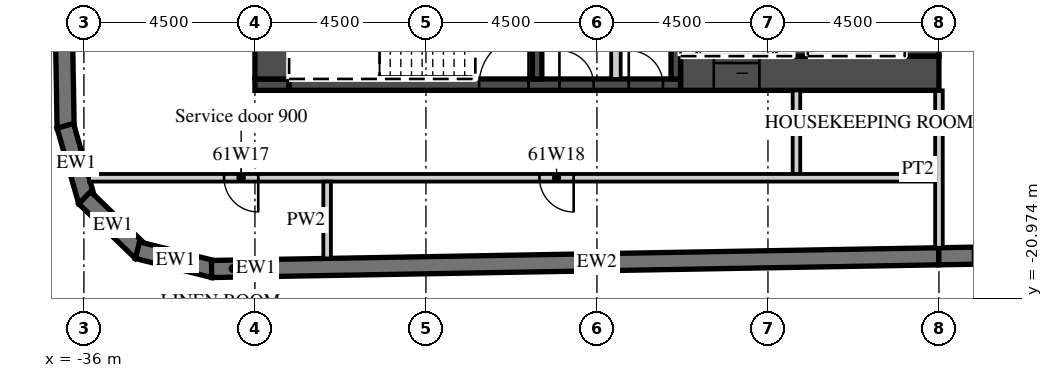
"""IFC4 building model, lengths in metres.
Left out: names, types, materials, properties, quantities, classifications, styles, units other than length and angle.
Written with IfcOpenShell. Run it as: python <this file> out.ifc"""

import sys

from ifc_helpers import new_model, si_unit, direction, frame, frame_2d, origin, place, context, subcontext, project, spatial, polyline, rectangle, outline, extrude, element, fill, save


model = new_model("IFC4")
c1 = context("Model", 3, precision=1e-05, world=origin(), true_north=direction((0.0, 1.0)))
c2 = subcontext(c1, "Body", "Model", "MODEL_VIEW")
j1 = project(units=[si_unit("LENGTHUNIT", "METRE"), si_unit("PLANEANGLEUNIT", "RADIAN")], contexts=[c1])
p1 = place(None, origin())
s1 = spatial("IfcSite", under=j1, at=p1, CompositionType="ELEMENT")
p2 = place(p1, origin())
s2 = spatial("IfcBuilding", under=s1, at=p2, CompositionType="ELEMENT")
p3 = place(p2, frame((0.0, 0.0, 247.4)))
s3 = spatial("IfcBuildingStorey", under=s2, at=p3, CompositionType="ELEMENT", Elevation=247.4)
p4 = place(p3, frame((-37.057, 16.503, 0.0), z_axis=(0.0, 0.0, 1.0), x_axis=(0.017452279857, -0.999847697366, 0.0)))
e1 = element("IfcWall", 1, at=p4, inside=s3, PredefinedType="SOLIDWALL", context=c2, shape_type="SweptSolid", body=[
    extrude(rectangle(XDim=33.0, YDim=0.45, at=frame_2d((16.5, 0.0))), origin(), (0.0, 0.0, 1.0), 3.02),
])
p5 = place(p3, frame((-36.49, -16.434, 0.0), z_axis=(0.0, 0.0, 1.0), x_axis=(0.275577603096, -0.961278827745, 0.0)))
e2 = element("IfcWall", 2, at=p5, inside=s3, PredefinedType="SOLIDWALL", context=c2, shape_type="SweptSolid", body=[
    extrude(outline(polyline([(0.0, -0.225), (2.071, -0.225), (1.95, 0.225), (0.121, 0.225), (0.0, -0.225)])), origin(), (0.0, 0.0, 1.0), 3.02),
])
p6 = place(p3, frame((-35.979, -18.324, 0.0), z_axis=(0.0, 0.0, 1.0), x_axis=(0.719320193998, -0.694678672846, 0.0)))
e3 = element("IfcWall", 3, at=p6, inside=s3, PredefinedType="SOLIDWALL", context=c2, shape_type="SweptSolid", body=[
    extrude(outline(polyline([(0.0, -0.225), (2.071, -0.225), (1.95, 0.225), (0.121, 0.225), (0.0, -0.225)])), origin(), (0.0, 0.0, 1.0), 3.02),
])
p7 = place(p3, frame((-34.591, -19.706, 0.0), z_axis=(0.0, 0.0, 1.0), x_axis=(0.970315655375, -0.241841950319, 0.0)))
e4 = element("IfcWall", 4, at=p7, inside=s3, PredefinedType="SOLIDWALL", context=c2, shape_type="SweptSolid", body=[
    extrude(outline(polyline([(0.0, -0.225), (2.071, -0.225), (1.95, 0.225), (0.121, 0.225), (0.0, -0.225)])), origin(), (0.0, 0.0, 1.0), 3.02),
])
p8 = place(p3, frame((-32.641, -20.2, 0.0), z_axis=(0.0, 0.0, 1.0), x_axis=(0.99984870815, 0.017394275206, 0.0)))
e5 = element("IfcWall", 5, at=p8, inside=s3, PredefinedType="SOLIDWALL", context=c2, shape_type="SweptSolid", body=[
    extrude(rectangle(XDim=1.137, YDim=0.45, at=frame_2d((0.568, 0.0))), origin(), (0.0, 0.0, 1.0), 3.02),
])
p9 = place(p3, frame((-31.504, -20.18, 0.0), z_axis=(0.0, 0.0, 1.0), x_axis=(0.999847677887, 0.017453395744, 0.0)))
e6 = element("IfcWall", 6, at=p9, inside=s3, PredefinedType="SOLIDWALL", context=c2, shape_type="SweptSolid", body=[
    extrude(rectangle(XDim=18.003, YDim=0.45, at=frame_2d((9.001, 0.0))), origin(), (0.0, 0.0, 1.0), 3.02),
])
p10 = place(p3, frame((-13.504, -19.866, 0.0), z_axis=(0.0, 0.0, 1.0), x_axis=(0.999847672978, 0.017453676992, 0.0)))
e7 = element("IfcWall", 7, at=p10, inside=s3, PredefinedType="SOLIDWALL", context=c2, shape_type="SweptSolid", body=[
    extrude(rectangle(XDim=52.86, YDim=0.45, at=frame_2d((26.43, 0.0))), origin(), (0.0, 0.0, 1.0), 3.02),
])
p11 = place(p10, frame((0.9, 0.0, 0.45)))
e8 = element("IfcOpeningElement", 8, at=p11, cuts=e7, PredefinedType="OPENING", context=c2, shape_type="SweptSolid", body=[
    extrude(rectangle(XDim=2.7, YDim=2.25, at=frame_2d((1.35, 1.125))), frame((0.0, 0.235, 0.0), z_axis=(0.0, -1.0, 0.0), x_axis=(1.0, 0.0, 0.0)), (0.0, 0.0, 1.0), 0.47),
])
p12 = place(p10, frame((5.401, 0.0, 0.45)))
e9 = element("IfcOpeningElement", 9, at=p12, cuts=e7, PredefinedType="OPENING", context=c2, shape_type="SweptSolid", body=[
    extrude(rectangle(XDim=2.7, YDim=2.25, at=frame_2d((1.35, 1.125))), frame((0.0, 0.235, 0.0), z_axis=(0.0, -1.0, 0.0), x_axis=(1.0, 0.0, 0.0)), (0.0, 0.0, 1.0), 0.47),
])
p13 = place(p10, frame((9.902, 0.0, 0.45)))
e10 = element("IfcOpeningElement", 10, at=p13, cuts=e7, PredefinedType="OPENING", context=c2, shape_type="SweptSolid", body=[
    extrude(rectangle(XDim=2.7, YDim=2.25, at=frame_2d((1.35, 1.125))), frame((0.0, 0.235, 0.0), z_axis=(0.0, -1.0, 0.0), x_axis=(1.0, 0.0, 0.0)), (0.0, 0.0, 1.0), 0.47),
])
p14 = place(p10, frame((14.402, 0.0, 0.45)))
e11 = element("IfcOpeningElement", 11, at=p14, cuts=e7, PredefinedType="OPENING", context=c2, shape_type="SweptSolid", body=[
    extrude(rectangle(XDim=2.7, YDim=2.25, at=frame_2d((1.35, 1.125))), frame((0.0, 0.235, 0.0), z_axis=(0.0, -1.0, 0.0), x_axis=(1.0, 0.0, 0.0)), (0.0, 0.0, 1.0), 0.47),
])
p15 = place(p10, frame((18.903, 0.0, 0.45)))
e12 = element("IfcOpeningElement", 12, at=p15, cuts=e7, PredefinedType="OPENING", context=c2, shape_type="SweptSolid", body=[
    extrude(rectangle(XDim=2.7, YDim=2.25, at=frame_2d((1.35, 1.125))), frame((0.0, 0.235, 0.0), z_axis=(0.0, -1.0, 0.0), x_axis=(1.0, 0.0, 0.0)), (0.0, 0.0, 1.0), 0.47),
])
p16 = place(p10, frame((23.404, 0.0, 0.45)))
e13 = element("IfcOpeningElement", 13, at=p16, cuts=e7, PredefinedType="OPENING", context=c2, shape_type="SweptSolid", body=[
    extrude(rectangle(XDim=2.7, YDim=2.25, at=frame_2d((1.35, 1.125))), frame((0.0, 0.235, 0.0), z_axis=(0.0, -1.0, 0.0), x_axis=(1.0, 0.0, 0.0)), (0.0, 0.0, 1.0), 0.47),
])
p17 = place(p10, frame((27.904, 0.0, 0.45)))
e14 = element("IfcOpeningElement", 14, at=p17, cuts=e7, PredefinedType="OPENING", context=c2, shape_type="SweptSolid", body=[
    extrude(rectangle(XDim=2.7, YDim=2.25, at=frame_2d((1.35, 1.125))), frame((0.0, 0.235, 0.0), z_axis=(0.0, -1.0, 0.0), x_axis=(1.0, 0.0, 0.0)), (0.0, 0.0, 1.0), 0.47),
])
p18 = place(p10, frame((32.405, 0.0, 0.45)))
e15 = element("IfcOpeningElement", 15, at=p18, cuts=e7, PredefinedType="OPENING", context=c2, shape_type="SweptSolid", body=[
    extrude(rectangle(XDim=2.7, YDim=2.25, at=frame_2d((1.35, 1.125))), frame((0.0, 0.235, 0.0), z_axis=(0.0, -1.0, 0.0), x_axis=(1.0, 0.0, 0.0)), (0.0, 0.0, 1.0), 0.47),
])
p19 = place(p10, frame((36.906, 0.0, 0.45)))
e16 = element("IfcOpeningElement", 16, at=p19, cuts=e7, PredefinedType="OPENING", context=c2, shape_type="SweptSolid", body=[
    extrude(rectangle(XDim=2.7, YDim=2.25, at=frame_2d((1.35, 1.125))), frame((0.0, 0.235, 0.0), z_axis=(0.0, -1.0, 0.0), x_axis=(1.0, 0.0, 0.0)), (0.0, 0.0, 1.0), 0.47),
])
p20 = place(p10, frame((41.406, 0.0, 0.45)))
e17 = element("IfcOpeningElement", 17, at=p20, cuts=e7, PredefinedType="OPENING", context=c2, shape_type="SweptSolid", body=[
    extrude(rectangle(XDim=2.7, YDim=2.25, at=frame_2d((1.35, 1.125))), frame((0.0, 0.235, 0.0), z_axis=(0.0, -1.0, 0.0), x_axis=(1.0, 0.0, 0.0)), (0.0, 0.0, 1.0), 0.47),
])
p21 = place(p10, frame((45.907, 0.0, 0.45)))
e18 = element("IfcOpeningElement", 18, at=p21, cuts=e7, PredefinedType="OPENING", context=c2, shape_type="SweptSolid", body=[
    extrude(rectangle(XDim=2.7, YDim=2.25, at=frame_2d((1.35, 1.125))), frame((0.0, 0.235, 0.0), z_axis=(0.0, -1.0, 0.0), x_axis=(1.0, 0.0, 0.0)), (0.0, 0.0, 1.0), 0.47),
])
p22 = place(p3, frame((-13.5, -19.641, 0.0), z_axis=(0.0, 0.0, 1.0), x_axis=(0.0, 1.0, 0.0)))
e19 = element("IfcWall", 19, at=p22, inside=s3, PredefinedType="PARTITIONING", context=c2, shape_type="SweptSolid", body=[
    extrude(rectangle(XDim=4.141, YDim=0.2, at=frame_2d((2.071, 0.0))), origin(), (0.0, 0.0, 1.0), 3.02),
])
p23 = place(p3, frame((-20.3, -15.05, 0.0), z_axis=(0.0, 0.0, 1.0), x_axis=(1.0, 0.0, 0.0)))
e20 = element("IfcWall", 20, at=p23, inside=s3, PredefinedType="SHEAR", context=c2, shape_type="SweptSolid", body=[
    extrude(rectangle(XDim=6.8, YDim=0.9, at=frame_2d((3.4, 0.0))), origin(), (0.0, 0.0, 1.0), 3.02),
])
p24 = place(p23, frame((0.875, 0.0, 0.0)))
e21 = element("IfcOpeningElement", 21, at=p24, cuts=e20, PredefinedType="OPENING", context=c2, shape_type="SweptSolid", body=[
    extrude(rectangle(XDim=1.2, YDim=2.1, at=frame_2d((0.6, 1.05))), frame((0.0, 0.46, 0.0), z_axis=(0.0, -1.0, 0.0), x_axis=(1.0, 0.0, 0.0)), (0.0, 0.0, 1.0), 0.92),
])
p25 = place(p3, frame((-31.5, -15.35, 0.0), z_axis=(0.0, 0.0, 1.0), x_axis=(1.0, 0.0, 0.0)))
e22 = element("IfcWall", 22, at=p25, inside=s3, PredefinedType="SHEAR", context=c2, shape_type="SweptSolid", body=[
    extrude(rectangle(XDim=0.9, YDim=0.3, at=frame_2d((0.45, 0.0))), origin(), (0.0, 0.0, 1.0), 3.02),
])
p26 = place(p3, frame((-30.6, -15.35, 0.0), z_axis=(0.0, 0.0, 1.0), x_axis=(1.0, 0.0, 0.0)))
e23 = element("IfcWall", 23, at=p26, inside=s3, PredefinedType="SHEAR", context=c2, shape_type="SweptSolid", body=[
    extrude(rectangle(XDim=10.3, YDim=0.3, at=frame_2d((5.15, 0.0))), origin(), (0.0, 0.0, 1.0), 3.02),
])
p27 = place(p26, frame((5.0, 0.0, 0.0)))
e24 = element("IfcOpeningElement", 24, at=p27, cuts=e23, PredefinedType="OPENING", context=c2, shape_type="SweptSolid", body=[
    extrude(rectangle(XDim=1.3, YDim=2.1, at=frame_2d((0.65, 1.05))), frame((0.0, 0.16, 0.0), z_axis=(0.0, -1.0, 0.0), x_axis=(1.0, 0.0, 0.0)), (0.0, 0.0, 1.0), 0.32),
])
p28 = place(p26, frame((7.113, 0.0, 0.0)))
e25 = element("IfcOpeningElement", 25, at=p28, cuts=e23, PredefinedType="OPENING", context=c2, shape_type="SweptSolid", body=[
    extrude(rectangle(XDim=0.9, YDim=2.1, at=frame_2d((0.45, 1.05))), frame((0.0, 0.16, 0.0), z_axis=(0.0, -1.0, 0.0), x_axis=(1.0, 0.0, 0.0)), (0.0, 0.0, 1.0), 0.32),
])
p29 = place(p26, frame((8.938, 0.0, 0.0)))
e26 = element("IfcOpeningElement", 26, at=p29, cuts=e23, PredefinedType="OPENING", context=c2, shape_type="SweptSolid", body=[
    extrude(rectangle(XDim=0.9, YDim=2.1, at=frame_2d((0.45, 1.05))), frame((0.0, 0.16, 0.0), z_axis=(0.0, -1.0, 0.0), x_axis=(1.0, 0.0, 0.0)), (0.0, 0.0, 1.0), 0.32),
])
p30 = place(p3, frame((-31.05, -15.2, 0.0), z_axis=(0.0, 0.0, 1.0), x_axis=(0.0, 1.0, 0.0)))
e27 = element("IfcWall", 27, at=p30, inside=s3, PredefinedType="SHEAR", context=c2, shape_type="SweptSolid", body=[
    extrude(rectangle(XDim=12.8, YDim=0.9, at=frame_2d((6.4, 0.0))), origin(), (0.0, 0.0, 1.0), 3.02),
])
p31 = place(p30, frame((11.5, 0.0, 0.0)))
e28 = element("IfcOpeningElement", 28, at=p31, cuts=e27, PredefinedType="OPENING", context=c2, shape_type="SweptSolid", body=[
    extrude(rectangle(XDim=1.1, YDim=2.1, at=frame_2d((0.55, 1.05))), frame((0.0, 0.46, 0.0), z_axis=(0.0, -1.0, 0.0), x_axis=(1.0, 0.0, 0.0)), (0.0, 0.0, 1.0), 0.92),
])
p32 = place(p3, frame((-13.95, -14.6, 0.0), z_axis=(0.0, 0.0, 1.0), x_axis=(0.0, 1.0, 0.0)))
e29 = element("IfcWall", 29, at=p32, inside=s3, PredefinedType="SHEAR", context=c2, shape_type="SweptSolid", body=[
    extrude(rectangle(XDim=12.2, YDim=0.9, at=frame_2d((6.1, 0.0))), origin(), (0.0, 0.0, 1.0), 3.02),
])
p33 = place(p3, frame((-17.15, -14.6, 0.0), z_axis=(0.0, 0.0, 1.0), x_axis=(0.0, 1.0, 0.0)))
e30 = element("IfcWall", 30, at=p33, inside=s3, PredefinedType="SHEAR", context=c2, shape_type="SweptSolid", body=[
    extrude(rectangle(XDim=5.8, YDim=0.4, at=frame_2d((2.9, 0.0))), origin(), (0.0, 0.0, 1.0), 3.02),
])
for number, where, z_axis, x_axis in (
    (31, (-20.425, -15.2, 0.0), (0.0, 0.0, 1.0), (0.0, 1.0, 0.0)),
    (32, (-24.075, -15.2, 0.0), (0.0, 0.0, 1.0), (0.0, 1.0, 0.0)),
):
    element("IfcWall", number, at=place(p3, frame(where, z_axis=z_axis, x_axis=x_axis)), inside=s3, PredefinedType="SHEAR", context=c2, shape_type="SweptSolid", body=[
        extrude(rectangle(XDim=3.25, YDim=0.25, at=frame_2d((1.625, 0.0))), origin(), (0.0, 0.0, 1.0), 3.02),
    ])
p34 = place(p3, frame((-22.0, -15.2, 0.0), z_axis=(0.0, 0.0, 1.0), x_axis=(0.0, 1.0, 0.0)))
e33 = element("IfcWall", 33, at=p34, inside=s3, PredefinedType="PARTITIONING", context=c2, shape_type="SweptSolid", body=[
    extrude(rectangle(XDim=3.25, YDim=0.25, at=frame_2d((1.625, 0.0))), origin(), (0.0, 0.0, 1.0), 3.02),
])
p35 = place(p3, frame((-17.25, -17.7, 0.0), z_axis=(0.0, 0.0, 1.0), x_axis=(0.0, 1.0, 0.0)))
e34 = element("IfcWall", 34, at=p35, inside=s3, PredefinedType="PARTITIONING", context=c2, shape_type="SweptSolid", body=[
    extrude(rectangle(XDim=2.2, YDim=0.2, at=frame_2d((1.1, 0.0))), origin(), (0.0, 0.0, 1.0), 3.02),
])
p36 = place(p3, frame((-35.864, -17.8, 0.0), z_axis=(0.0, 0.0, 1.0), x_axis=(1.0, 0.0, 0.0)))
e35 = element("IfcWall", 35, at=p36, inside=s3, PredefinedType="PARTITIONING", context=c2, shape_type="SweptSolid", body=[
    extrude(rectangle(XDim=22.264, YDim=0.2, at=frame_2d((11.132, 0.0))), origin(), (0.0, 0.0, 1.0), 3.02),
])
p37 = place(p36, frame((3.551, 0.0, 0.0)))
e36 = element("IfcOpeningElement", 36, at=p37, cuts=e35, PredefinedType="OPENING", context=c2, shape_type="SweptSolid", body=[
    extrude(rectangle(XDim=0.9, YDim=2.1, at=frame_2d((0.45, 1.05))), frame((0.0, 0.11, 0.0), z_axis=(0.0, -1.0, 0.0), x_axis=(1.0, 0.0, 0.0)), (0.0, 0.0, 1.0), 0.22),
])
p38 = place(p36, frame((11.851, 0.0, 0.0)))
e37 = element("IfcOpeningElement", 37, at=p38, cuts=e35, PredefinedType="OPENING", context=c2, shape_type="SweptSolid", body=[
    extrude(rectangle(XDim=0.9, YDim=2.1, at=frame_2d((0.45, 1.05))), frame((0.0, 0.11, 0.0), z_axis=(0.0, -1.0, 0.0), x_axis=(1.0, 0.0, 0.0)), (0.0, 0.0, 1.0), 0.22),
])
p39 = place(p3, frame((-29.6, -19.922, 0.0), z_axis=(0.0, 0.0, 1.0), x_axis=(0.0, 1.0, 0.0)))
e38 = element("IfcWall", 38, at=p39, inside=s3, PredefinedType="PARTITIONING", context=c2, shape_type="SweptSolid", body=[
    extrude(rectangle(XDim=2.022, YDim=0.2, at=frame_2d((1.011, 0.0))), origin(), (0.0, 0.0, 1.0), 3.02),
])
p40 = place(p11, origin())
e39 = element("IfcWindow", 39, at=p40, inside=s3, PartitioningType="SINGLE_PANEL", PredefinedType="WINDOW", context=c2, shape_type="SweptSolid", body=[
    extrude(rectangle(XDim=2.7, YDim=2.25, at=frame_2d((1.35, 1.125))), frame((0.0, 0.09, 0.0), z_axis=(0.0, -1.0, 0.0), x_axis=(1.0, 0.0, 0.0)), (0.0, 0.0, 1.0), 0.06),
])
fill(e8, e39)
p41 = place(p24, origin())
e40 = element("IfcDoor", 40, at=p41, inside=s3, OperationType="SLIDING_TO_LEFT", PredefinedType="DOOR", context=c2, shape_type="SweptSolid", body=[
    extrude(rectangle(XDim=1.2, YDim=2.1, at=frame_2d((0.6, 1.05))), frame((0.0, 0.025, 0.0), z_axis=(0.0, -1.0, 0.0), x_axis=(1.0, 0.0, 0.0)), (0.0, 0.0, 1.0), 0.05),
])
fill(e21, e40)
p42 = place(p27, origin())
e41 = element("IfcDoor", 41, at=p42, inside=s3, OperationType="SINGLE_SWING_RIGHT", PredefinedType="DOOR", context=c2, shape_type="SweptSolid", body=[
    extrude(rectangle(XDim=1.3, YDim=2.1, at=frame_2d((0.65, 1.05))), frame((0.0, 0.025, 0.0), z_axis=(0.0, -1.0, 0.0), x_axis=(1.0, 0.0, 0.0)), (0.0, 0.0, 1.0), 0.05),
])
fill(e24, e41)
p43 = place(p28, origin())
e42 = element("IfcDoor", 42, at=p43, inside=s3, OperationType="SINGLE_SWING_LEFT", PredefinedType="DOOR", context=c2, shape_type="SweptSolid", body=[
    extrude(rectangle(XDim=0.9, YDim=2.1, at=frame_2d((0.45, 1.05))), frame((0.0, 0.025, 0.0), z_axis=(0.0, -1.0, 0.0), x_axis=(1.0, 0.0, 0.0)), (0.0, 0.0, 1.0), 0.05),
])
fill(e25, e42)
p44 = place(p29, origin())
e43 = element("IfcDoor", 43, at=p44, inside=s3, OperationType="SINGLE_SWING_LEFT", PredefinedType="DOOR", context=c2, shape_type="SweptSolid", body=[
    extrude(rectangle(XDim=0.9, YDim=2.1, at=frame_2d((0.45, 1.05))), frame((0.0, 0.025, 0.0), z_axis=(0.0, -1.0, 0.0), x_axis=(1.0, 0.0, 0.0)), (0.0, 0.0, 1.0), 0.05),
])
fill(e26, e43)
p45 = place(p37, origin())
e44 = element("IfcDoor", 44, at=p45, inside=s3, OperationType="SINGLE_SWING_RIGHT", PredefinedType="DOOR", context=c2, shape_type="SweptSolid", body=[
    extrude(rectangle(XDim=0.9, YDim=2.1, at=frame_2d((0.45, 1.05))), frame((0.0, 0.025, 0.0), z_axis=(0.0, -1.0, 0.0), x_axis=(1.0, 0.0, 0.0)), (0.0, 0.0, 1.0), 0.05),
])
fill(e36, e44)
p46 = place(p38, origin())
e45 = element("IfcDoor", 45, at=p46, inside=s3, OperationType="SINGLE_SWING_RIGHT", PredefinedType="DOOR", context=c2, shape_type="SweptSolid", body=[
    extrude(rectangle(XDim=0.9, YDim=2.1, at=frame_2d((0.45, 1.05))), frame((0.0, 0.025, 0.0), z_axis=(0.0, -1.0, 0.0), x_axis=(1.0, 0.0, 0.0)), (0.0, 0.0, 1.0), 0.05),
])
fill(e37, e45)
save(model, sys.argv[1])
